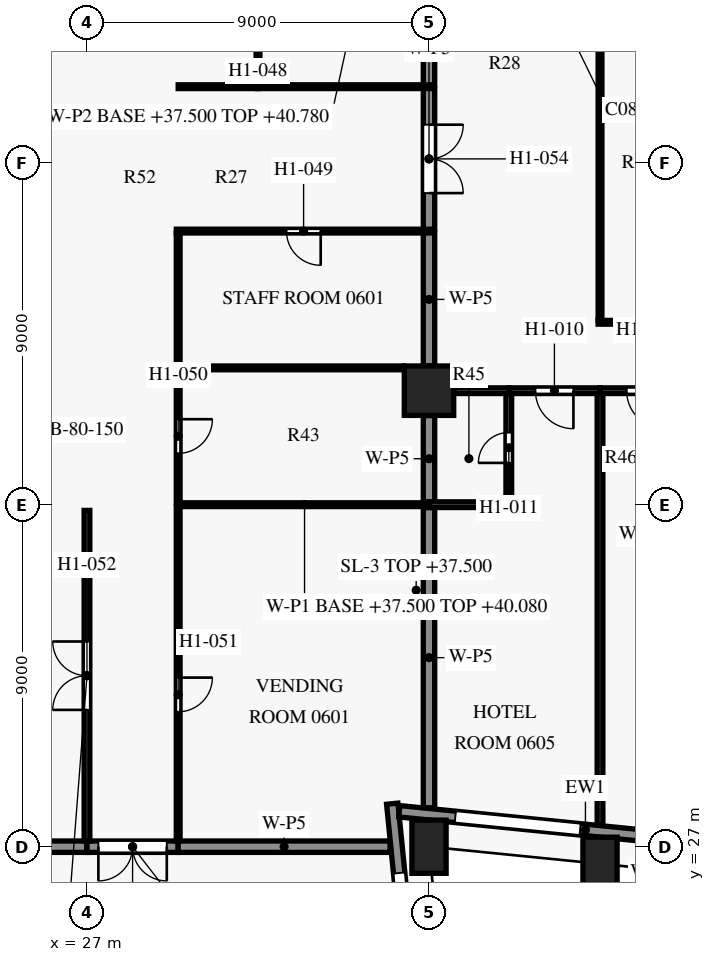
"""IFC4 building model, lengths in metres.
Left out: names, types, materials, properties, quantities, classifications, styles, units other than length and angle.
Written with IfcOpenShell. Run it as: python <this file> out.ifc"""

import sys

from ifc_helpers import new_model, si_unit, direction, frame, frame_2d, origin, origin_2d, place, context, subcontext, project, spatial, rectangle, extrude, element, fill, save


model = new_model("IFC4")
c1 = context("Model", 3, precision=1e-05, world=origin(), true_north=direction((0.0, 1.0)))
c2 = subcontext(c1, "Body", "Model", "MODEL_VIEW")
j1 = project(units=[si_unit("LENGTHUNIT", "METRE"), si_unit("PLANEANGLEUNIT", "RADIAN")], contexts=[c1])
p1 = place(None, origin())
s1 = spatial("IfcSite", under=j1, at=p1, CompositionType="ELEMENT")
p2 = place(p1, origin())
s2 = spatial("IfcBuilding", under=s1, at=p2, CompositionType="ELEMENT")
p3 = place(p2, frame((0.0, 0.0, 37.5)))
s3 = spatial("IfcBuildingStorey", under=s2, at=p3, CompositionType="ELEMENT", Elevation=37.5)
for number, where, z_axis, x_axis in (
    (1, (36.0, 27.0, 0.0), (0.0, 0.0, 1.0), (-0.1, 0.995, 0.0)),
    (2, (40.5, 26.55, 0.0), (0.0, 0.0, 1.0), (0.995, -0.1, 0.0)),
):
    element("IfcColumn", number, at=place(p3, frame(where, z_axis=z_axis, x_axis=x_axis)), inside=s3, PredefinedType="COLUMN", context=c2, shape_type="SweptSolid", body=[
        extrude(rectangle(XDim=0.9, YDim=1.4, at=origin_2d()), origin(), (0.0, 0.0, 1.0), 3.6),
    ])
p4 = place(p3, frame((36.0, 39.0, 0.0), z_axis=(0.0, 0.0, 1.0), x_axis=(1.0, 0.0, 0.0)))
e3 = element("IfcColumn", 3, at=p4, inside=s3, PredefinedType="COLUMN", context=c2, shape_type="SweptSolid", body=[
    extrude(rectangle(XDim=1.3, YDim=1.3, at=origin_2d()), origin(), (0.0, 0.0, 1.0), 3.6),
])
p5 = place(p3, frame((35.033, 28.132, 0.0), z_axis=(0.0, 0.0, 1.0), x_axis=(0.099487051997, -0.995038856771, 0.0)))
e4 = element("IfcWall", 4, at=p5, inside=s3, PredefinedType="SOLIDWALL", context=c2, shape_type="SweptSolid", body=[
    extrude(rectangle(XDim=10.152, YDim=0.3, at=frame_2d((5.076, 0.0))), origin(), (0.0, 0.0, 1.0), 2.95),
])
p6 = place(p5, frame((1.833, 0.0, 0.15)))
e5 = element("IfcOpeningElement", 5, at=p6, cuts=e4, PredefinedType="OPENING", context=c2, shape_type="SweptSolid", body=[
    extrude(rectangle(XDim=3.3, YDim=2.4, at=frame_2d((1.65, 1.2))), frame((0.0, 0.16, 0.0), z_axis=(0.0, -1.0, 0.0), x_axis=(1.0, 0.0, 0.0)), (0.0, 0.0, 1.0), 0.32),
])
p7 = place(p5, frame((7.106, 0.0, 0.75)))
e6 = element("IfcOpeningElement", 6, at=p7, cuts=e4, PredefinedType="OPENING", context=c2, shape_type="SweptSolid", body=[
    extrude(rectangle(XDim=1.8, YDim=1.8, at=frame_2d((0.9, 0.9))), frame((0.0, 0.16, 0.0), z_axis=(0.0, -1.0, 0.0), x_axis=(1.0, 0.0, 0.0)), (0.0, 0.0, 1.0), 0.32),
])
p8 = place(p3, frame((45.015, 26.953, 0.0), z_axis=(0.0, 0.0, 1.0), x_axis=(-0.995036699177, 0.099508629231, 0.0)))
e7 = element("IfcWall", 7, at=p8, inside=s3, PredefinedType="SOLIDWALL", context=c2, shape_type="SweptSolid", body=[
    extrude(rectangle(XDim=9.846, YDim=0.3, at=frame_2d((4.923, 0.0))), origin(), (0.0, 0.0, 1.0), 2.95),
])
p9 = place(p8, frame((1.291, 0.0, 0.75)))
e8 = element("IfcOpeningElement", 8, at=p9, cuts=e7, PredefinedType="OPENING", context=c2, shape_type="SweptSolid", body=[
    extrude(rectangle(XDim=1.8, YDim=1.8, at=frame_2d((0.9, 0.9))), frame((0.0, 0.16, 0.0), z_axis=(0.0, -1.0, 0.0), x_axis=(1.0, 0.0, 0.0)), (0.0, 0.0, 1.0), 0.32),
])
p10 = place(p8, frame((5.064, 0.0, 0.15)))
e9 = element("IfcOpeningElement", 9, at=p10, cuts=e7, PredefinedType="OPENING", context=c2, shape_type="SweptSolid", body=[
    extrude(rectangle(XDim=3.3, YDim=2.4, at=frame_2d((1.65, 1.2))), frame((0.0, 0.16, 0.0), z_axis=(0.0, -1.0, 0.0), x_axis=(1.0, 0.0, 0.0)), (0.0, 0.0, 1.0), 0.32),
])
p11 = place(p3, frame((27.0, 27.0, 0.0), z_axis=(0.0, 0.0, 1.0), x_axis=(-1.0, 0.0, 0.0)))
e10 = element("IfcWall", 10, at=p11, inside=s3, PredefinedType="PARTITIONING", context=c2, shape_type="SweptSolid", body=[
    extrude(rectangle(XDim=2.345, YDim=0.3, at=frame_2d((1.172, 0.0))), origin(), (0.0, 0.0, 1.0), 2.58),
])
p12 = place(p3, frame((29.4, 27.0, 0.0), z_axis=(0.0, 0.0, 1.0), x_axis=(-1.0, 0.0, 0.0)))
e11 = element("IfcWall", 11, at=p12, inside=s3, PredefinedType="PARTITIONING", context=c2, shape_type="SweptSolid", body=[
    extrude(rectangle(XDim=2.4, YDim=0.3, at=frame_2d((1.2, 0.0))), origin(), (0.0, 0.0, 1.0), 2.58),
])
p13 = place(p12, frame((0.3, 0.0, 0.0)))
e12 = element("IfcOpeningElement", 12, at=p13, cuts=e11, PredefinedType="OPENING", context=c2, shape_type="SweptSolid", body=[
    extrude(rectangle(XDim=1.8, YDim=2.1, at=frame_2d((0.9, 1.05))), frame((0.0, 0.16, 0.0), z_axis=(0.0, -1.0, 0.0), x_axis=(1.0, 0.0, 0.0)), (0.0, 0.0, 1.0), 0.32),
])
p14 = place(p3, frame((34.975, 27.0, 0.0), z_axis=(0.0, 0.0, 1.0), x_axis=(-1.0, 0.0, 0.0)))
e13 = element("IfcWall", 13, at=p14, inside=s3, PredefinedType="PARTITIONING", context=c2, shape_type="SweptSolid", body=[
    extrude(rectangle(XDim=5.575, YDim=0.3, at=frame_2d((2.788, 0.0))), origin(), (0.0, 0.0, 1.0), 2.58),
])
p15 = place(p3, frame((27.0, 27.15, 0.0), z_axis=(0.0, 0.0, 1.0), x_axis=(0.0, 1.0, 0.0)))
e14 = element("IfcWall", 14, at=p15, inside=s3, PredefinedType="PARTITIONING", context=c2, shape_type="SweptSolid", body=[
    extrude(rectangle(XDim=8.7, YDim=0.15, at=frame_2d((4.35, 0.0))), origin(), (0.0, 0.0, 1.0), 3.28),
])
p16 = place(p15, frame((3.45, 0.0, 0.0)))
e15 = element("IfcOpeningElement", 15, at=p16, cuts=e14, PredefinedType="OPENING", context=c2, shape_type="SweptSolid", body=[
    extrude(rectangle(XDim=1.8, YDim=2.1, at=frame_2d((0.9, 1.05))), frame((0.0, 0.085, 0.0), z_axis=(0.0, -1.0, 0.0), x_axis=(1.0, 0.0, 0.0)), (0.0, 0.0, 1.0), 0.17),
])
p17 = place(p3, frame((36.0, 35.925, 0.0), z_axis=(0.0, 0.0, 1.0), x_axis=(0.0, -1.0, 0.0)))
e16 = element("IfcWall", 16, at=p17, inside=s3, PredefinedType="PARTITIONING", context=c2, shape_type="SweptSolid", body=[
    extrude(rectangle(XDim=7.9, YDim=0.3, at=frame_2d((3.95, 0.0))), origin(), (0.0, 0.0, 1.0), 2.58),
])
p18 = place(p3, frame((29.4, 35.95, 0.0), z_axis=(0.0, 0.0, 1.0), x_axis=(0.0, -1.0, 0.0)))
e17 = element("IfcWall", 17, at=p18, inside=s3, PredefinedType="PARTITIONING", context=c2, shape_type="SweptSolid", body=[
    extrude(rectangle(XDim=8.8, YDim=0.1, at=frame_2d((4.4, 0.0))), origin(), (0.0, 0.0, 1.0), 3.28),
])
p19 = place(p18, frame((4.5, 0.0, 0.0)))
e18 = element("IfcOpeningElement", 18, at=p19, cuts=e17, PredefinedType="OPENING", context=c2, shape_type="SweptSolid", body=[
    extrude(rectangle(XDim=0.9, YDim=2.1, at=frame_2d((0.45, 1.05))), frame((0.0, 0.06, 0.0), z_axis=(0.0, -1.0, 0.0), x_axis=(1.0, 0.0, 0.0)), (0.0, 0.0, 1.0), 0.12),
])
p20 = place(p3, frame((36.0, 36.0, 0.0), z_axis=(0.0, 0.0, 1.0), x_axis=(-1.0, 0.0, 0.0)))
e19 = element("IfcWall", 19, at=p20, inside=s3, PredefinedType="PARTITIONING", context=c2, shape_type="SweptSolid", body=[
    extrude(rectangle(XDim=6.55, YDim=0.1, at=frame_2d((3.275, 0.0))), origin(), (0.0, 0.0, 1.0), 2.58),
])
p21 = place(p3, frame((36.0, 36.0, 0.0), z_axis=(0.0, 0.0, 1.0), x_axis=(1.0, 0.0, 0.0)))
e20 = element("IfcWall", 20, at=p21, inside=s3, PredefinedType="PARTITIONING", context=c2, shape_type="SweptSolid", body=[
    extrude(rectangle(XDim=2.175, YDim=0.15, at=frame_2d((1.087, 0.0))), origin(), (0.0, 0.0, 1.0), 2.58),
])
p22 = place(p3, frame((38.1, 36.075, 0.0), z_axis=(0.0, 0.0, 1.0), x_axis=(0.0, 1.0, 0.0)))
e21 = element("IfcWall", 21, at=p22, inside=s3, PredefinedType="PARTITIONING", context=c2, shape_type="SweptSolid", body=[
    extrude(rectangle(XDim=2.85, YDim=0.15, at=frame_2d((1.425, 0.0))), origin(), (0.0, 0.0, 1.0), 2.58),
])
p23 = place(p22, frame((1.025, 0.0, 0.0)))
e22 = element("IfcOpeningElement", 22, at=p23, cuts=e21, PredefinedType="OPENING", context=c2, shape_type="SweptSolid", body=[
    extrude(rectangle(XDim=0.8, YDim=2.1, at=frame_2d((0.4, 1.05))), frame((0.0, 0.085, 0.0), z_axis=(0.0, -1.0, 0.0), x_axis=(1.0, 0.0, 0.0)), (0.0, 0.0, 1.0), 0.17),
])
p24 = place(p3, frame((36.0, 38.345, 0.0), z_axis=(0.0, 0.0, 1.0), x_axis=(0.0, -1.0, 0.0)))
e23 = element("IfcWall", 23, at=p24, inside=s3, PredefinedType="PARTITIONING", context=c2, shape_type="SweptSolid", body=[
    extrude(rectangle(XDim=2.27, YDim=0.3, at=frame_2d((1.135, 0.0))), origin(), (0.0, 0.0, 1.0), 2.58),
])
p25 = place(p3, frame((40.5, 38.925, 0.0), z_axis=(0.0, 0.0, 1.0), x_axis=(0.0, -1.0, 0.0)))
e24 = element("IfcWall", 24, at=p25, inside=s3, PredefinedType="PARTITIONING", context=c2, shape_type="SweptSolid", body=[
    extrude(rectangle(XDim=11.35, YDim=0.15, at=frame_2d((5.675, 0.0))), origin(), (0.0, 0.0, 1.0), 2.58),
])
p26 = place(p3, frame((38.1, 39.0, 0.0), z_axis=(0.0, 0.0, 1.0), x_axis=(-1.0, 0.0, 0.0)))
e25 = element("IfcWall", 25, at=p26, inside=s3, PredefinedType="PARTITIONING", context=c2, shape_type="SweptSolid", body=[
    extrude(rectangle(XDim=1.445, YDim=0.15, at=frame_2d((0.723, 0.0))), origin(), (0.0, 0.0, 1.0), 2.58),
])
p27 = place(p3, frame((40.5, 39.0, 0.0), z_axis=(0.0, 0.0, 1.0), x_axis=(-1.0, 0.0, 0.0)))
e26 = element("IfcWall", 26, at=p27, inside=s3, PredefinedType="PARTITIONING", context=c2, shape_type="SweptSolid", body=[
    extrude(rectangle(XDim=2.4, YDim=0.15, at=frame_2d((1.2, 0.0))), origin(), (0.0, 0.0, 1.0), 2.58),
])
p28 = place(p27, frame((0.7, 0.0, 0.0)))
e27 = element("IfcOpeningElement", 27, at=p28, cuts=e26, PredefinedType="OPENING", context=c2, shape_type="SweptSolid", body=[
    extrude(rectangle(XDim=1.0, YDim=2.1, at=frame_2d((0.5, 1.05))), frame((0.0, 0.085, 0.0), z_axis=(0.0, -1.0, 0.0), x_axis=(1.0, 0.0, 0.0)), (0.0, 0.0, 1.0), 0.17),
])
p29 = place(p3, frame((42.9, 39.0, 0.0), z_axis=(0.0, 0.0, 1.0), x_axis=(-1.0, 0.0, 0.0)))
e28 = element("IfcWall", 28, at=p29, inside=s3, PredefinedType="PARTITIONING", context=c2, shape_type="SweptSolid", body=[
    extrude(rectangle(XDim=2.4, YDim=0.15, at=frame_2d((1.2, 0.0))), origin(), (0.0, 0.0, 1.0), 2.58),
])
p30 = place(p29, frame((0.7, 0.0, 0.0)))
e29 = element("IfcOpeningElement", 29, at=p30, cuts=e28, PredefinedType="OPENING", context=c2, shape_type="SweptSolid", body=[
    extrude(rectangle(XDim=1.0, YDim=2.1, at=frame_2d((0.5, 1.05))), frame((0.0, 0.085, 0.0), z_axis=(0.0, -1.0, 0.0), x_axis=(1.0, 0.0, 0.0)), (0.0, 0.0, 1.0), 0.17),
])
p31 = place(p3, frame((29.4, 39.55, 0.0), z_axis=(0.0, 0.0, 1.0), x_axis=(0.0, -1.0, 0.0)))
e30 = element("IfcWall", 30, at=p31, inside=s3, PredefinedType="PARTITIONING", context=c2, shape_type="SweptSolid", body=[
    extrude(rectangle(XDim=3.5, YDim=0.1, at=frame_2d((1.75, 0.0))), origin(), (0.0, 0.0, 1.0), 3.28),
])
p32 = place(p31, frame((1.3, 0.0, 0.0)))
e31 = element("IfcOpeningElement", 31, at=p32, cuts=e30, PredefinedType="OPENING", context=c2, shape_type="SweptSolid", body=[
    extrude(rectangle(XDim=0.9, YDim=2.1, at=frame_2d((0.45, 1.05))), frame((0.0, 0.06, 0.0), z_axis=(0.0, -1.0, 0.0), x_axis=(1.0, 0.0, 0.0)), (0.0, 0.0, 1.0), 0.12),
])
p33 = place(p3, frame((35.345, 39.6, 0.0), z_axis=(0.0, 0.0, 1.0), x_axis=(-1.0, 0.0, 0.0)))
e32 = element("IfcWall", 32, at=p33, inside=s3, PredefinedType="PARTITIONING", context=c2, shape_type="SweptSolid", body=[
    extrude(rectangle(XDim=5.895, YDim=0.1, at=frame_2d((2.948, 0.0))), origin(), (0.0, 0.0, 1.0), 3.28),
])
p34 = place(p3, frame((40.45, 40.8, 0.0), z_axis=(0.0, 0.0, 1.0), x_axis=(1.0, 0.0, 0.0)))
e33 = element("IfcWall", 33, at=p34, inside=s3, PredefinedType="PARTITIONING", context=c2, shape_type="SweptSolid", body=[
    extrude(rectangle(XDim=2.1, YDim=0.1, at=frame_2d((1.05, 0.0))), origin(), (0.0, 0.0, 1.0), 3.28),
])
p35 = place(p3, frame((29.4, 43.15, 0.0), z_axis=(0.0, 0.0, 1.0), x_axis=(0.0, -1.0, 0.0)))
e34 = element("IfcWall", 34, at=p35, inside=s3, PredefinedType="PARTITIONING", context=c2, shape_type="SweptSolid", body=[
    extrude(rectangle(XDim=3.5, YDim=0.1, at=frame_2d((1.75, 0.0))), origin(), (0.0, 0.0, 1.0), 3.28),
])
p36 = place(p3, frame((36.0, 43.15, 0.0), z_axis=(0.0, 0.0, 1.0), x_axis=(0.0, -1.0, 0.0)))
e35 = element("IfcWall", 35, at=p36, inside=s3, PredefinedType="PARTITIONING", context=c2, shape_type="SweptSolid", body=[
    extrude(rectangle(XDim=3.495, YDim=0.3, at=frame_2d((1.748, 0.0))), origin(), (0.0, 0.0, 1.0), 2.58),
])
p37 = place(p3, frame((35.85, 43.2, 0.0), z_axis=(0.0, 0.0, 1.0), x_axis=(-1.0, 0.0, 0.0)))
e36 = element("IfcWall", 36, at=p37, inside=s3, PredefinedType="PARTITIONING", context=c2, shape_type="SweptSolid", body=[
    extrude(rectangle(XDim=6.5, YDim=0.1, at=frame_2d((3.25, 0.0))), origin(), (0.0, 0.0, 1.0), 3.28),
])
p38 = place(p37, frame((2.7, 0.0, 0.0)))
e37 = element("IfcOpeningElement", 37, at=p38, cuts=e36, PredefinedType="OPENING", context=c2, shape_type="SweptSolid", body=[
    extrude(rectangle(XDim=0.9, YDim=2.1, at=frame_2d((0.45, 1.05))), frame((0.0, 0.06, 0.0), z_axis=(0.0, -1.0, 0.0), x_axis=(1.0, 0.0, 0.0)), (0.0, 0.0, 1.0), 0.12),
])
p39 = place(p3, frame((36.0, 46.95, 0.0), z_axis=(0.0, 0.0, 1.0), x_axis=(0.0, -1.0, 0.0)))
e38 = element("IfcWall", 38, at=p39, inside=s3, PredefinedType="PARTITIONING", context=c2, shape_type="SweptSolid", body=[
    extrude(rectangle(XDim=3.7, YDim=0.3, at=frame_2d((1.85, 0.0))), origin(), (0.0, 0.0, 1.0), 2.58),
])
p40 = place(p39, frame((0.95, 0.0, 0.0)))
e39 = element("IfcOpeningElement", 39, at=p40, cuts=e38, PredefinedType="OPENING", context=c2, shape_type="SweptSolid", body=[
    extrude(rectangle(XDim=1.8, YDim=2.1, at=frame_2d((0.9, 1.05))), frame((0.0, 0.16, 0.0), z_axis=(0.0, -1.0, 0.0), x_axis=(1.0, 0.0, 0.0)), (0.0, 0.0, 1.0), 0.32),
])
p41 = place(p3, frame((29.4, 47.0, 0.0), z_axis=(0.0, 0.0, 1.0), x_axis=(1.0, 0.0, 0.0)))
e40 = element("IfcWall", 40, at=p41, inside=s3, PredefinedType="PARTITIONING", context=c2, shape_type="SweptSolid", body=[
    extrude(rectangle(XDim=2.1, YDim=0.1, at=frame_2d((1.05, 0.0))), origin(), (0.0, 0.0, 1.0), 3.28),
])
p42 = place(p3, frame((31.5, 47.0, 0.0), z_axis=(0.0, 0.0, 1.0), x_axis=(1.0, 0.0, 0.0)))
e41 = element("IfcWall", 41, at=p42, inside=s3, PredefinedType="PARTITIONING", context=c2, shape_type="SweptSolid", body=[
    extrude(rectangle(XDim=4.35, YDim=0.1, at=frame_2d((2.175, 0.0))), origin(), (0.0, 0.0, 1.0), 3.28),
])
p43 = place(p3, frame((40.5, 49.15, 0.0), z_axis=(0.0, 0.0, 1.0), x_axis=(0.0, -1.0, 0.0)))
e42 = element("IfcWall", 42, at=p43, inside=s3, PredefinedType="PARTITIONING", context=c2, shape_type="SweptSolid", body=[
    extrude(rectangle(XDim=8.3, YDim=0.1, at=frame_2d((4.15, 0.0))), origin(), (0.0, 0.0, 1.0), 3.28),
])
p44 = place(p3, frame((36.0, 50.345, 0.0), z_axis=(0.0, 0.0, 1.0), x_axis=(0.0, -1.0, 0.0)))
e43 = element("IfcWall", 43, at=p44, inside=s3, PredefinedType="PARTITIONING", context=c2, shape_type="SweptSolid", body=[
    extrude(rectangle(XDim=3.295, YDim=0.3, at=frame_2d((1.647, 0.0))), origin(), (0.0, 0.0, 1.0), 2.58),
])
p45 = place(p3, frame((31.5, 50.925, 0.0), z_axis=(0.0, 0.0, 1.0), x_axis=(0.0, -1.0, 0.0)))
e44 = element("IfcWall", 44, at=p45, inside=s3, PredefinedType="PARTITIONING", context=c2, shape_type="SweptSolid", body=[
    extrude(rectangle(XDim=3.875, YDim=0.1, at=frame_2d((1.938, 0.0))), origin(), (0.0, 0.0, 1.0), 3.28),
])
p46 = place(p45, frame((1.475, 0.0, 0.0)))
e45 = element("IfcOpeningElement", 45, at=p46, cuts=e44, PredefinedType="OPENING", context=c2, shape_type="SweptSolid", body=[
    extrude(rectangle(XDim=0.9, YDim=2.1, at=frame_2d((0.45, 1.05))), frame((0.0, 0.06, 0.0), z_axis=(0.0, -1.0, 0.0), x_axis=(1.0, 0.0, 0.0)), (0.0, 0.0, 1.0), 0.12),
])
p47 = place(p6, origin())
e46 = element("IfcWindow", 46, at=p47, inside=s3, PartitioningType="SINGLE_PANEL", PredefinedType="WINDOW", context=c2, shape_type="SweptSolid", body=[
    extrude(rectangle(XDim=3.3, YDim=2.4, at=frame_2d((1.65, 1.2))), frame((0.0, 0.03, 0.0), z_axis=(0.0, -1.0, 0.0), x_axis=(1.0, 0.0, 0.0)), (0.0, 0.0, 1.0), 0.06),
])
fill(e5, e46)
p48 = place(p10, origin())
e47 = element("IfcWindow", 47, at=p48, inside=s3, PartitioningType="SINGLE_PANEL", PredefinedType="WINDOW", context=c2, shape_type="SweptSolid", body=[
    extrude(rectangle(XDim=3.3, YDim=2.4, at=frame_2d((1.65, 1.2))), frame((0.0, 0.03, 0.0), z_axis=(0.0, -1.0, 0.0), x_axis=(1.0, 0.0, 0.0)), (0.0, 0.0, 1.0), 0.06),
])
fill(e9, e47)
p49 = place(p28, origin())
e48 = element("IfcDoor", 48, at=p49, inside=s3, OperationType="SINGLE_SWING_LEFT", PredefinedType="DOOR", context=c2, shape_type="SweptSolid", body=[
    extrude(rectangle(XDim=1.0, YDim=2.1, at=frame_2d((0.5, 1.05))), frame((0.0, 0.025, 0.0), z_axis=(0.0, -1.0, 0.0), x_axis=(1.0, 0.0, 0.0)), (0.0, 0.0, 1.0), 0.05),
])
fill(e27, e48)
p50 = place(p23, origin())
e49 = element("IfcDoor", 49, at=p50, inside=s3, OperationType="SINGLE_SWING_LEFT", PredefinedType="DOOR", context=c2, shape_type="SweptSolid", body=[
    extrude(rectangle(XDim=0.8, YDim=2.1, at=frame_2d((0.4, 1.05))), frame((0.0, 0.025, 0.0), z_axis=(0.0, -1.0, 0.0), x_axis=(1.0, 0.0, 0.0)), (0.0, 0.0, 1.0), 0.05),
])
fill(e22, e49)
p51 = place(p30, origin())
e50 = element("IfcDoor", 50, at=p51, inside=s3, OperationType="SINGLE_SWING_LEFT", PredefinedType="DOOR", context=c2, shape_type="SweptSolid", body=[
    extrude(rectangle(XDim=1.0, YDim=2.1, at=frame_2d((0.5, 1.05))), frame((0.0, 0.025, 0.0), z_axis=(0.0, -1.0, 0.0), x_axis=(1.0, 0.0, 0.0)), (0.0, 0.0, 1.0), 0.05),
])
fill(e29, e50)
p52 = place(p38, origin())
e51 = element("IfcDoor", 51, at=p52, inside=s3, OperationType="SINGLE_SWING_LEFT", PredefinedType="DOOR", context=c2, shape_type="SweptSolid", body=[
    extrude(rectangle(XDim=0.9, YDim=2.1, at=frame_2d((0.45, 1.05))), frame((0.0, 0.025, 0.0), z_axis=(0.0, -1.0, 0.0), x_axis=(1.0, 0.0, 0.0)), (0.0, 0.0, 1.0), 0.05),
])
fill(e37, e51)
p53 = place(p32, origin())
e52 = element("IfcDoor", 52, at=p53, inside=s3, OperationType="SINGLE_SWING_RIGHT", PredefinedType="DOOR", context=c2, shape_type="SweptSolid", body=[
    extrude(rectangle(XDim=0.9, YDim=2.1, at=frame_2d((0.45, 1.05))), frame((0.0, 0.025, 0.0), z_axis=(0.0, -1.0, 0.0), x_axis=(1.0, 0.0, 0.0)), (0.0, 0.0, 1.0), 0.05),
])
fill(e31, e52)
p54 = place(p19, origin())
e53 = element("IfcDoor", 53, at=p54, inside=s3, OperationType="SINGLE_SWING_LEFT", PredefinedType="DOOR", context=c2, shape_type="SweptSolid", body=[
    extrude(rectangle(XDim=0.9, YDim=2.1, at=frame_2d((0.45, 1.05))), frame((0.0, 0.025, 0.0), z_axis=(0.0, -1.0, 0.0), x_axis=(1.0, 0.0, 0.0)), (0.0, 0.0, 1.0), 0.05),
])
fill(e18, e53)
p55 = place(p16, origin())
e54 = element("IfcDoor", 54, at=p55, inside=s3, OperationType="DOUBLE_DOOR_SINGLE_SWING", PredefinedType="DOOR", context=c2, shape_type="SweptSolid", body=[
    extrude(rectangle(XDim=1.8, YDim=2.1, at=frame_2d((0.9, 1.05))), frame((0.0, 0.025, 0.0), z_axis=(0.0, -1.0, 0.0), x_axis=(1.0, 0.0, 0.0)), (0.0, 0.0, 1.0), 0.05),
])
fill(e15, e54)
p56 = place(p40, origin())
e55 = element("IfcDoor", 55, at=p56, inside=s3, OperationType="DOUBLE_DOOR_SINGLE_SWING", PredefinedType="DOOR", context=c2, shape_type="SweptSolid", body=[
    extrude(rectangle(XDim=1.8, YDim=2.1, at=frame_2d((0.9, 1.05))), frame((0.0, 0.025, 0.0), z_axis=(0.0, -1.0, 0.0), x_axis=(1.0, 0.0, 0.0)), (0.0, 0.0, 1.0), 0.05),
])
fill(e39, e55)
p57 = place(p13, origin())
e56 = element("IfcDoor", 56, at=p57, inside=s3, OperationType="DOUBLE_DOOR_SINGLE_SWING", PredefinedType="DOOR", context=c2, shape_type="SweptSolid", body=[
    extrude(rectangle(XDim=1.8, YDim=2.1, at=frame_2d((0.9, 1.05))), frame((0.0, 0.025, 0.0), z_axis=(0.0, -1.0, 0.0), x_axis=(1.0, 0.0, 0.0)), (0.0, 0.0, 1.0), 0.05),
])
fill(e12, e56)
save(model, sys.argv[1])
